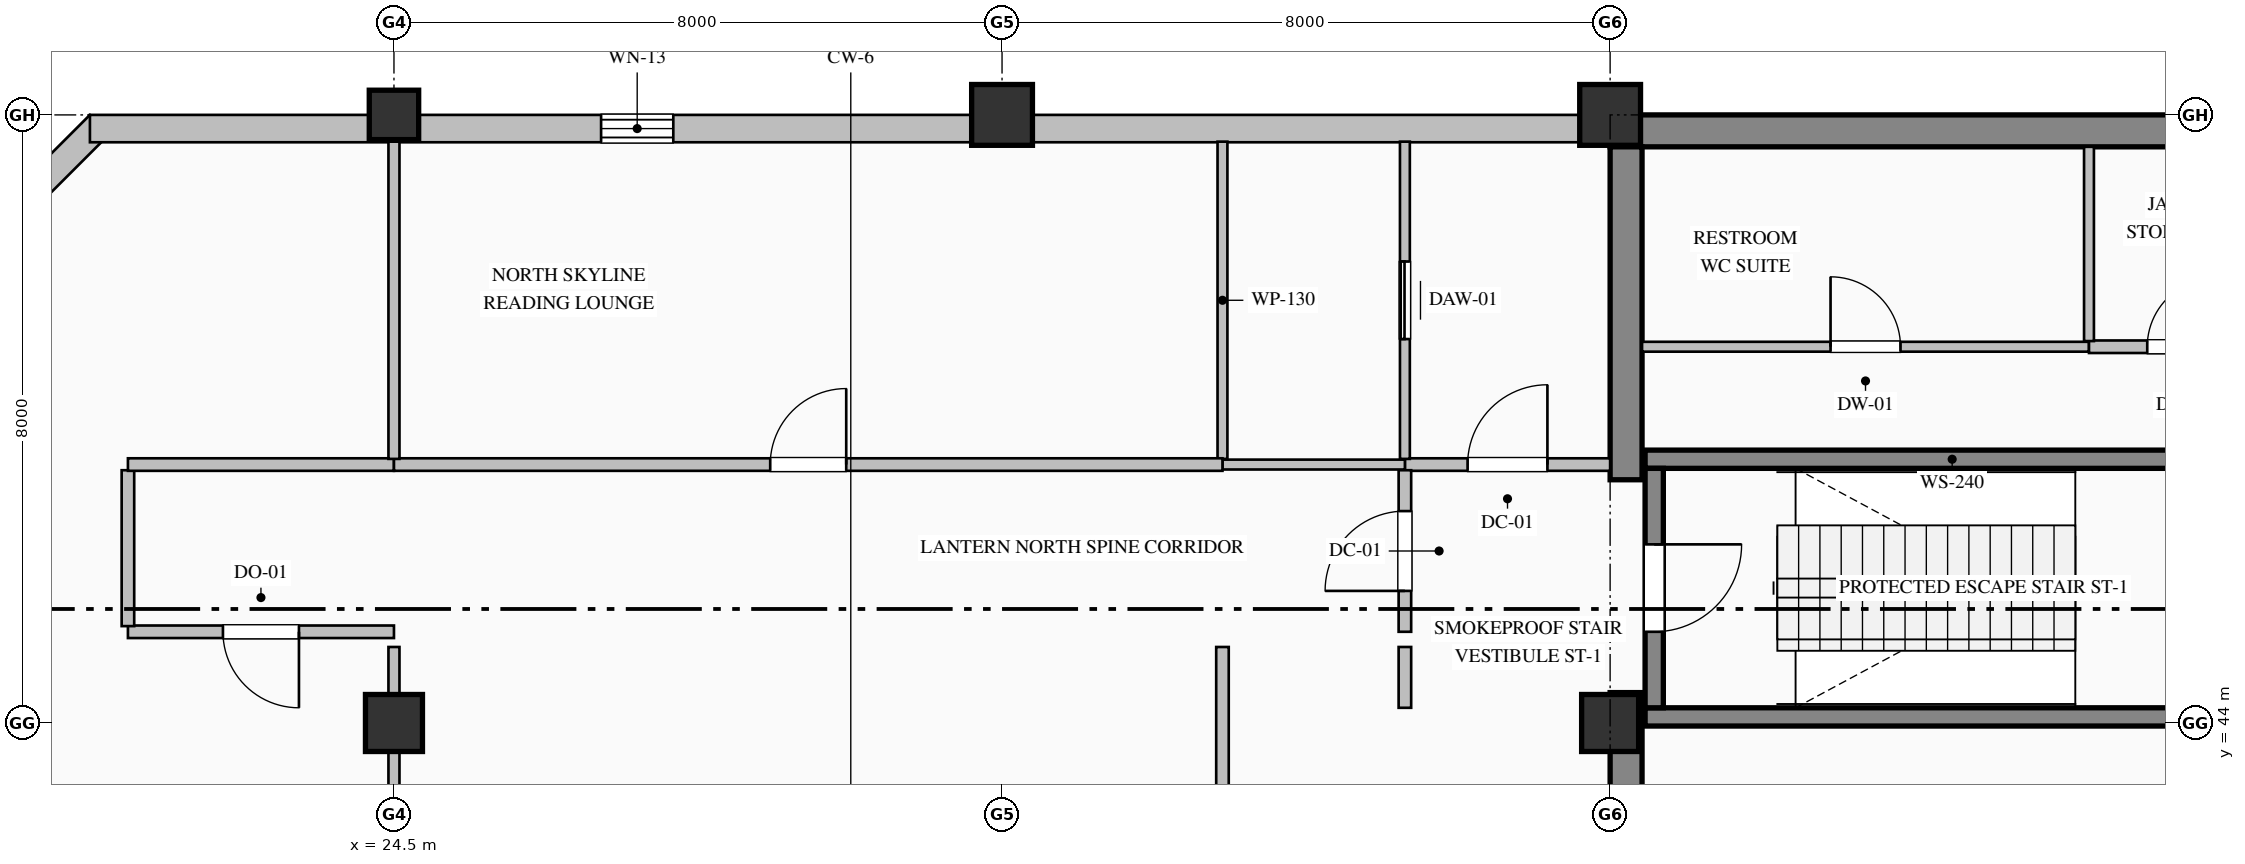
"""IFC4 building model, lengths in metres.
Left out: names, types, materials, properties, quantities, classifications, styles, units other than length and angle.
Written with IfcOpenShell. Run it as: python <this file> out.ifc"""

import sys

from ifc_helpers import new_model, si_unit, direction, frame, frame_2d, origin, origin_2d, place, context, subcontext, project, spatial, rectangle, hollow_rectangle, extrude, element, fill, save


model = new_model("IFC4")
c1 = context("Model", 3, precision=1e-05, world=origin(), true_north=direction((0.0, 1.0)))
c2 = subcontext(c1, "Body", "Model", "MODEL_VIEW")
j1 = project(units=[si_unit("LENGTHUNIT", "METRE"), si_unit("PLANEANGLEUNIT", "RADIAN")], contexts=[c1])
p1 = place(None, origin())
s1 = spatial("IfcSite", under=j1, at=p1, CompositionType="ELEMENT")
p2 = place(p1, origin())
s2 = spatial("IfcBuilding", under=s1, at=p2, CompositionType="ELEMENT")
p3 = place(p2, frame((0.0, 0.0, 373.0)))
s3 = spatial("IfcBuildingStorey", under=s2, at=p3, CompositionType="ELEMENT", Elevation=373.0)
p4 = place(p3, frame((40.5, 51.79, 0.0), z_axis=(0.0, 0.0, 1.0), x_axis=(1.0, 0.0, 0.0)))
e1 = element("IfcWall", 1, at=p4, inside=s3, PredefinedType="SHEAR", context=c2, shape_type="SweptSolid", body=[
    extrude(rectangle(XDim=23.5, YDim=0.42, at=frame_2d((11.75, 0.0))), origin(), (0.0, 0.0, 1.0), 5.11),
])
p5 = place(p3, frame((40.71, 36.42, 0.0), z_axis=(0.0, 0.0, 1.0), x_axis=(0.0, 1.0, 0.0)))
e2 = element("IfcWall", 2, at=p5, inside=s3, PredefinedType="SHEAR", context=c2, shape_type="SweptSolid", body=[
    extrude(rectangle(XDim=7.98, YDim=0.42, at=frame_2d((3.99, 0.0))), origin(), (0.0, 0.0, 1.0), 5.11),
])
p6 = place(p3, frame((40.71, 47.2, 0.0), z_axis=(0.0, 0.0, 1.0), x_axis=(0.0, 1.0, 0.0)))
e3 = element("IfcWall", 3, at=p6, inside=s3, PredefinedType="SHEAR", context=c2, shape_type="SweptSolid", body=[
    extrude(rectangle(XDim=4.38, YDim=0.42, at=frame_2d((2.19, 0.0))), origin(), (0.0, 0.0, 1.0), 5.11),
])
p7 = place(p3, frame((24.5, 44.0, 0.0), z_axis=(0.0, 0.0, 1.0), x_axis=(1.0, 0.0, 0.0)))
e4 = element("IfcColumn", 4, at=p7, inside=s3, PredefinedType="COLUMN", context=c2, shape_type="SweptSolid", body=[
    extrude(rectangle(XDim=0.75, YDim=0.75, at=origin_2d()), origin(), (0.0, 0.0, 1.0), 5.4),
])
p8 = place(p3, frame((24.5, 52.0, 0.0), z_axis=(0.0, 0.0, 1.0), x_axis=(1.0, 0.0, 0.0)))
e5 = element("IfcColumn", 5, at=p8, inside=s3, PredefinedType="COLUMN", context=c2, shape_type="SweptSolid", body=[
    extrude(hollow_rectangle(XDim=0.65, YDim=0.65, WallThickness=0.028, at=origin_2d()), origin(), (0.0, 0.0, 1.0), 5.4),
])
p9 = place(p3, frame((32.5, 52.0, 0.0), z_axis=(0.0, 0.0, 1.0), x_axis=(1.0, 0.0, 0.0)))
e6 = element("IfcColumn", 6, at=p9, inside=s3, PredefinedType="COLUMN", context=c2, shape_type="SweptSolid", body=[
    extrude(hollow_rectangle(XDim=0.8, YDim=0.8, WallThickness=0.032, at=origin_2d()), origin(), (0.0, 0.0, 1.0), 5.4),
])
p10 = place(p3, frame((40.5, 44.0, 0.0), z_axis=(0.0, 0.0, 1.0), x_axis=(1.0, 0.0, 0.0)))
e7 = element("IfcColumn", 7, at=p10, inside=s3, PredefinedType="COLUMN", context=c2, shape_type="SweptSolid", body=[
    extrude(rectangle(XDim=0.75, YDim=0.75, at=origin_2d()), origin(), (0.0, 0.0, 1.0), 5.4),
])
p11 = place(p3, frame((40.5, 52.0, 0.0), z_axis=(0.0, 0.0, 1.0), x_axis=(1.0, 0.0, 0.0)))
e8 = element("IfcColumn", 8, at=p11, inside=s3, PredefinedType="COLUMN", context=c2, shape_type="SweptSolid", body=[
    extrude(hollow_rectangle(XDim=0.8, YDim=0.8, WallThickness=0.032, at=origin_2d()), origin(), (0.0, 0.0, 1.0), 5.4),
])
p12 = place(p3, frame((16.627, 47.873, 0.0), z_axis=(0.0, 0.0, 1.0), x_axis=(0.707106781187, 0.707106781187, 0.0)))
e9 = element("IfcWall", 9, at=p12, inside=s3, PredefinedType="SOLIDWALL", context=c2, shape_type="SweptSolid", body=[
    extrude(rectangle(XDim=5.657, YDim=0.36, at=frame_2d((2.828, 0.0))), origin(), (0.0, 0.0, 1.0), 5.11),
])
p13 = place(p3, frame((20.5, 51.82, 0.0), z_axis=(0.0, 0.0, 1.0), x_axis=(1.0, 0.0, 0.0)))
e10 = element("IfcWall", 10, at=p13, inside=s3, PredefinedType="SOLIDWALL", context=c2, shape_type="SweptSolid", body=[
    extrude(rectangle(XDim=20.02, YDim=0.36, at=frame_2d((10.01, 0.0))), origin(), (0.0, 0.0, 1.0), 4.66),
])
p14 = place(p13, frame((6.725, 0.0, 0.9)))
e11 = element("IfcOpeningElement", 11, at=p14, cuts=e10, PredefinedType="OPENING", context=c2, shape_type="SweptSolid", body=[
    extrude(rectangle(XDim=0.95, YDim=1.85, at=frame_2d((0.475, 0.925))), frame((0.0, 0.19, 0.0), z_axis=(0.0, -1.0, 0.0), x_axis=(1.0, 0.0, 0.0)), (0.0, 0.0, 1.0), 0.38),
])
for number, where, z_axis, x_axis in (
    (12, (40.96, 47.47, 0.0), (0.0, 0.0, 1.0), (1.0, 0.0, 0.0)),
    (13, (49.04, 44.08, 0.0), (0.0, 0.0, 1.0), (-1.0, 0.0, 0.0)),
):
    element("IfcWall", number, at=place(p3, frame(where, z_axis=z_axis, x_axis=x_axis)), inside=s3, PredefinedType="SOLIDWALL", context=c2, shape_type="SweptSolid", body=[
        extrude(rectangle(XDim=8.08, YDim=0.24, at=frame_2d((4.04, 0.0))), origin(), (0.0, 0.0, 1.0), 5.4),
    ])
p15 = place(p3, frame((41.08, 47.35, 0.0), z_axis=(0.0, 0.0, 1.0), x_axis=(0.0, -1.0, 0.0)))
e14 = element("IfcWall", 14, at=p15, inside=s3, PredefinedType="SOLIDWALL", context=c2, shape_type="SweptSolid", body=[
    extrude(rectangle(XDim=3.15, YDim=0.24, at=frame_2d((1.575, 0.0))), origin(), (0.0, 0.0, 1.0), 5.4),
])
p16 = place(p15, frame((1.0, 0.0, 0.0)))
e15 = element("IfcOpeningElement", 15, at=p16, cuts=e14, PredefinedType="OPENING", context=c2, shape_type="SweptSolid", body=[
    extrude(rectangle(XDim=1.15, YDim=2.2, at=frame_2d((0.575, 1.1))), frame((0.0, 0.13, 0.0), z_axis=(0.0, -1.0, 0.0), x_axis=(1.0, 0.0, 0.0)), (0.0, 0.0, 1.0), 0.26),
])
p17 = place(p3, frame((37.8, 47.4, 0.0), z_axis=(0.0, 0.0, 1.0), x_axis=(1.0, 0.0, 0.0)))
e16 = element("IfcWall", 16, at=p17, inside=s3, PredefinedType="PARTITIONING", context=c2, shape_type="SweptSolid", body=[
    extrude(rectangle(XDim=2.7, YDim=0.165, at=frame_2d((1.35, 0.0))), origin(), (0.0, 0.0, 1.0), 5.11),
])
p18 = place(p17, frame((0.825, 0.0, 0.0)))
e17 = element("IfcOpeningElement", 17, at=p18, cuts=e16, PredefinedType="OPENING", context=c2, shape_type="SweptSolid", body=[
    extrude(rectangle(XDim=1.05, YDim=2.15, at=frame_2d((0.525, 1.075))), frame((0.0, 0.093, 0.0), z_axis=(0.0, -1.0, 0.0), x_axis=(1.0, 0.0, 0.0)), (0.0, 0.0, 1.0), 0.185),
])
p19 = place(p3, frame((37.8, 45.2, 0.0), z_axis=(0.0, 0.0, 1.0), x_axis=(0.0, 1.0, 0.0)))
e18 = element("IfcWall", 18, at=p19, inside=s3, PredefinedType="PARTITIONING", context=c2, shape_type="SweptSolid", body=[
    extrude(rectangle(XDim=2.125, YDim=0.165, at=frame_2d((1.063, 0.0))), origin(), (0.0, 0.0, 1.0), 5.11),
])
p20 = place(p19, frame((0.538, 0.0, 0.0)))
e19 = element("IfcOpeningElement", 19, at=p20, cuts=e18, PredefinedType="OPENING", context=c2, shape_type="SweptSolid", body=[
    extrude(rectangle(XDim=1.05, YDim=2.15, at=frame_2d((0.525, 1.075))), frame((0.0, 0.093, 0.0), z_axis=(0.0, -1.0, 0.0), x_axis=(1.0, 0.0, 0.0)), (0.0, 0.0, 1.0), 0.185),
])
p21 = place(p3, frame((37.8, 44.2, 0.0), z_axis=(0.0, 0.0, 1.0), x_axis=(0.0, 1.0, 0.0)))
e20 = element("IfcWall", 20, at=p21, inside=s3, PredefinedType="PARTITIONING", context=c2, shape_type="SweptSolid", body=[
    extrude(rectangle(XDim=0.8, YDim=0.165, at=frame_2d((0.4, 0.0))), origin(), (0.0, 0.0, 1.0), 5.11),
])
p22 = place(p3, frame((37.8, 47.475, 0.0), z_axis=(0.0, 0.0, 1.0), x_axis=(0.0, 1.0, 0.0)))
e21 = element("IfcWall", 21, at=p22, inside=s3, PredefinedType="PARTITIONING", context=c2, shape_type="SweptSolid", body=[
    extrude(rectangle(XDim=4.173, YDim=0.13, at=frame_2d((2.087, 0.0))), origin(), (0.0, 0.0, 1.0), 5.11),
])
p23 = place(p22, frame((1.577, 0.0, 0.0)))
e22 = element("IfcOpeningElement", 22, at=p23, cuts=e21, PredefinedType="OPENING", context=c2, shape_type="SweptSolid", body=[
    extrude(rectangle(XDim=1.02, YDim=2.15, at=frame_2d((0.51, 1.075))), frame((0.0, 0.075, 0.0), z_axis=(0.0, -1.0, 0.0), x_axis=(1.0, 0.0, 0.0)), (0.0, 0.0, 1.0), 0.15),
])
p24 = place(p3, frame((37.8, 47.4, 0.0), z_axis=(0.0, 0.0, 1.0), x_axis=(-1.0, 0.0, 0.0)))
e23 = element("IfcWall", 23, at=p24, inside=s3, PredefinedType="PARTITIONING", context=c2, shape_type="SweptSolid", body=[
    extrude(rectangle(XDim=2.4, YDim=0.13, at=frame_2d((1.2, 0.0))), origin(), (0.0, 0.0, 1.0), 5.11),
])
p25 = place(p3, frame((35.4, 47.475, 0.0), z_axis=(0.0, 0.0, 1.0), x_axis=(0.0, 1.0, 0.0)))
e24 = element("IfcWall", 24, at=p25, inside=s3, PredefinedType="PARTITIONING", context=c2, shape_type="SweptSolid", body=[
    extrude(rectangle(XDim=4.173, YDim=0.13, at=frame_2d((2.087, 0.0))), origin(), (0.0, 0.0, 1.0), 5.11),
])
p26 = place(p3, frame((40.92, 48.95, 0.0), z_axis=(0.0, 0.0, 1.0), x_axis=(1.0, 0.0, 0.0)))
e25 = element("IfcWall", 25, at=p26, inside=s3, PredefinedType="PARTITIONING", context=c2, shape_type="SweptSolid", body=[
    extrude(rectangle(XDim=5.88, YDim=0.13, at=frame_2d((2.94, 0.0))), origin(), (0.0, 0.0, 1.0), 5.11),
])
p27 = place(p26, frame((2.48, 0.0, 0.0)))
e26 = element("IfcOpeningElement", 26, at=p27, cuts=e25, PredefinedType="OPENING", context=c2, shape_type="SweptSolid", body=[
    extrude(rectangle(XDim=0.92, YDim=2.15, at=frame_2d((0.46, 1.075))), frame((0.0, 0.075, 0.0), z_axis=(0.0, -1.0, 0.0), x_axis=(1.0, 0.0, 0.0)), (0.0, 0.0, 1.0), 0.15),
])
p28 = place(p3, frame((46.8, 48.95, 0.0), z_axis=(0.0, 0.0, 1.0), x_axis=(1.0, 0.0, 0.0)))
e27 = element("IfcWall", 27, at=p28, inside=s3, PredefinedType="PARTITIONING", context=c2, shape_type="SweptSolid", body=[
    extrude(rectangle(XDim=2.433, YDim=0.165, at=frame_2d((1.216, 0.0))), origin(), (0.0, 0.0, 1.0), 5.11),
])
p29 = place(p28, frame((0.767, 0.0, 0.0)))
e28 = element("IfcOpeningElement", 28, at=p29, cuts=e27, PredefinedType="OPENING", context=c2, shape_type="SweptSolid", body=[
    extrude(rectangle(XDim=0.9, YDim=2.15, at=frame_2d((0.45, 1.075))), frame((0.0, 0.093, 0.0), z_axis=(0.0, -1.0, 0.0), x_axis=(1.0, 0.0, 0.0)), (0.0, 0.0, 1.0), 0.185),
])
p30 = place(p3, frame((46.8, 51.58, 0.0), z_axis=(0.0, 0.0, 1.0), x_axis=(0.0, -1.0, 0.0)))
e29 = element("IfcWall", 29, at=p30, inside=s3, PredefinedType="PARTITIONING", context=c2, shape_type="SweptSolid", body=[
    extrude(rectangle(XDim=2.556, YDim=0.13, at=frame_2d((1.278, 0.0))), origin(), (0.0, 0.0, 1.0), 5.11),
])
p31 = place(p3, frame((24.5, 45.2, 0.0), z_axis=(0.0, 0.0, 1.0), x_axis=(-1.0, 0.0, 0.0)))
e30 = element("IfcWall", 30, at=p31, inside=s3, PredefinedType="PARTITIONING", context=c2, shape_type="SweptSolid", body=[
    extrude(rectangle(XDim=3.5, YDim=0.165, at=frame_2d((1.75, 0.0))), origin(), (0.0, 0.0, 1.0), 5.11),
])
p32 = place(p31, frame((1.25, 0.0, 0.0)))
e31 = element("IfcOpeningElement", 31, at=p32, cuts=e30, PredefinedType="OPENING", context=c2, shape_type="SweptSolid", body=[
    extrude(rectangle(XDim=1.0, YDim=2.15, at=frame_2d((0.5, 1.075))), frame((0.0, 0.093, 0.0), z_axis=(0.0, -1.0, 0.0), x_axis=(1.0, 0.0, 0.0)), (0.0, 0.0, 1.0), 0.185),
])
p33 = place(p3, frame((21.0, 45.274, 0.0), z_axis=(0.0, 0.0, 1.0), x_axis=(0.0, 1.0, 0.0)))
e32 = element("IfcWall", 32, at=p33, inside=s3, PredefinedType="PARTITIONING", context=c2, shape_type="SweptSolid", body=[
    extrude(rectangle(XDim=2.051, YDim=0.165, at=frame_2d((1.025, 0.0))), origin(), (0.0, 0.0, 1.0), 5.11),
])
p34 = place(p3, frame((21.0, 47.4, 0.0), z_axis=(0.0, 0.0, 1.0), x_axis=(1.0, 0.0, 0.0)))
e33 = element("IfcWall", 33, at=p34, inside=s3, PredefinedType="PARTITIONING", context=c2, shape_type="SweptSolid", body=[
    extrude(rectangle(XDim=3.5, YDim=0.165, at=frame_2d((1.75, 0.0))), origin(), (0.0, 0.0, 1.0), 5.11),
])
p35 = place(p3, frame((24.5, 47.4, 0.0), z_axis=(0.0, 0.0, 1.0), x_axis=(1.0, 0.0, 0.0)))
e34 = element("IfcWall", 34, at=p35, inside=s3, PredefinedType="PARTITIONING", context=c2, shape_type="SweptSolid", body=[
    extrude(rectangle(XDim=10.9, YDim=0.165, at=frame_2d((5.45, 0.0))), origin(), (0.0, 0.0, 1.0), 5.11),
])
p36 = place(p35, frame((4.95, 0.0, 0.0)))
e35 = element("IfcOpeningElement", 35, at=p36, cuts=e34, PredefinedType="OPENING", context=c2, shape_type="SweptSolid", body=[
    extrude(rectangle(XDim=1.0, YDim=2.15, at=frame_2d((0.5, 1.075))), frame((0.0, 0.093, 0.0), z_axis=(0.0, -1.0, 0.0), x_axis=(1.0, 0.0, 0.0)), (0.0, 0.0, 1.0), 0.185),
])
p37 = place(p3, frame((35.4, 36.064, 0.0), z_axis=(0.0, 0.0, 1.0), x_axis=(0.0, 1.0, 0.0)))
e36 = element("IfcWall", 36, at=p37, inside=s3, PredefinedType="PARTITIONING", context=c2, shape_type="SweptSolid", body=[
    extrude(rectangle(XDim=8.936, YDim=0.165, at=frame_2d((4.468, 0.0))), origin(), (0.0, 0.0, 1.0), 5.11),
])
p38 = place(p37, frame((3.968, 0.0, 0.0)))
e37 = element("IfcOpeningElement", 37, at=p38, cuts=e36, PredefinedType="OPENING", context=c2, shape_type="SweptSolid", body=[
    extrude(rectangle(XDim=1.0, YDim=2.15, at=frame_2d((0.5, 1.075))), frame((0.0, 0.093, 0.0), z_axis=(0.0, -1.0, 0.0), x_axis=(1.0, 0.0, 0.0)), (0.0, 0.0, 1.0), 0.185),
])
p39 = place(p3, frame((24.5, 36.064, 0.0), z_axis=(0.0, 0.0, 1.0), x_axis=(0.0, 1.0, 0.0)))
e38 = element("IfcWall", 38, at=p39, inside=s3, PredefinedType="PARTITIONING", context=c2, shape_type="SweptSolid", body=[
    extrude(rectangle(XDim=8.936, YDim=0.145, at=frame_2d((4.468, 0.0))), origin(), (0.0, 0.0, 1.0), 4.502),
])
p40 = place(p3, frame((24.5, 51.648, 0.0), z_axis=(0.0, 0.0, 1.0), x_axis=(0.0, -1.0, 0.0)))
e39 = element("IfcWall", 39, at=p40, inside=s3, PredefinedType="PARTITIONING", context=c2, shape_type="SweptSolid", body=[
    extrude(rectangle(XDim=4.173, YDim=0.145, at=frame_2d((2.087, 0.0))), origin(), (0.0, 0.0, 1.0), 4.502),
])
p41 = place(p14, origin())
e40 = element("IfcWindow", 40, at=p41, inside=s3, PartitioningType="SINGLE_PANEL", PredefinedType="WINDOW", context=c2, shape_type="SweptSolid", body=[
    extrude(rectangle(XDim=0.95, YDim=1.85, at=frame_2d((0.475, 0.925))), frame((0.0, 0.15, 0.0), z_axis=(0.0, -1.0, 0.0), x_axis=(1.0, 0.0, 0.0)), (0.0, 0.0, 1.0), 0.06),
])
fill(e11, e40)
p42 = place(p16, origin())
e41 = element("IfcDoor", 41, at=p42, inside=s3, OperationType="SINGLE_SWING_LEFT", PredefinedType="DOOR", context=c2, shape_type="SweptSolid", body=[
    extrude(rectangle(XDim=1.15, YDim=2.2, at=frame_2d((0.575, 1.1))), frame((0.0, 0.025, 0.0), z_axis=(0.0, -1.0, 0.0), x_axis=(1.0, 0.0, 0.0)), (0.0, 0.0, 1.0), 0.05),
])
fill(e15, e41)
p43 = place(p18, origin())
e42 = element("IfcDoor", 42, at=p43, inside=s3, OperationType="SINGLE_SWING_RIGHT", PredefinedType="DOOR", context=c2, shape_type="SweptSolid", body=[
    extrude(rectangle(XDim=1.05, YDim=2.15, at=frame_2d((0.525, 1.075))), frame((0.0, 0.025, 0.0), z_axis=(0.0, -1.0, 0.0), x_axis=(1.0, 0.0, 0.0)), (0.0, 0.0, 1.0), 0.05),
])
fill(e17, e42)
p44 = place(p20, origin())
e43 = element("IfcDoor", 43, at=p44, inside=s3, OperationType="SINGLE_SWING_LEFT", PredefinedType="DOOR", context=c2, shape_type="SweptSolid", body=[
    extrude(rectangle(XDim=1.05, YDim=2.15, at=frame_2d((0.525, 1.075))), frame((0.0, 0.025, 0.0), z_axis=(0.0, -1.0, 0.0), x_axis=(1.0, 0.0, 0.0)), (0.0, 0.0, 1.0), 0.05),
])
fill(e19, e43)
p45 = place(p23, origin())
e44 = element("IfcDoor", 44, at=p45, inside=s3, OperationType="SLIDING_TO_LEFT", PredefinedType="DOOR", context=c2, shape_type="SweptSolid", body=[
    extrude(rectangle(XDim=1.02, YDim=2.15, at=frame_2d((0.51, 1.075))), frame((0.0, 0.025, 0.0), z_axis=(0.0, -1.0, 0.0), x_axis=(1.0, 0.0, 0.0)), (0.0, 0.0, 1.0), 0.05),
])
fill(e22, e44)
p46 = place(p27, origin())
e45 = element("IfcDoor", 45, at=p46, inside=s3, OperationType="SINGLE_SWING_LEFT", PredefinedType="DOOR", context=c2, shape_type="SweptSolid", body=[
    extrude(rectangle(XDim=0.92, YDim=2.15, at=frame_2d((0.46, 1.075))), frame((0.0, 0.025, 0.0), z_axis=(0.0, -1.0, 0.0), x_axis=(1.0, 0.0, 0.0)), (0.0, 0.0, 1.0), 0.05),
])
fill(e26, e45)
p47 = place(p29, origin())
e46 = element("IfcDoor", 46, at=p47, inside=s3, OperationType="SINGLE_SWING_RIGHT", PredefinedType="DOOR", context=c2, shape_type="SweptSolid", body=[
    extrude(rectangle(XDim=0.9, YDim=2.15, at=frame_2d((0.45, 1.075))), frame((0.0, 0.025, 0.0), z_axis=(0.0, -1.0, 0.0), x_axis=(1.0, 0.0, 0.0)), (0.0, 0.0, 1.0), 0.05),
])
fill(e28, e46)
p48 = place(p32, origin())
e47 = element("IfcDoor", 47, at=p48, inside=s3, OperationType="SINGLE_SWING_LEFT", PredefinedType="DOOR", context=c2, shape_type="SweptSolid", body=[
    extrude(rectangle(XDim=1.0, YDim=2.15, at=frame_2d((0.5, 1.075))), frame((0.0, 0.025, 0.0), z_axis=(0.0, -1.0, 0.0), x_axis=(1.0, 0.0, 0.0)), (0.0, 0.0, 1.0), 0.05),
])
fill(e31, e47)
p49 = place(p36, origin())
e48 = element("IfcDoor", 48, at=p49, inside=s3, OperationType="SINGLE_SWING_RIGHT", PredefinedType="DOOR", context=c2, shape_type="SweptSolid", body=[
    extrude(rectangle(XDim=1.0, YDim=2.15, at=frame_2d((0.5, 1.075))), frame((0.0, 0.025, 0.0), z_axis=(0.0, -1.0, 0.0), x_axis=(1.0, 0.0, 0.0)), (0.0, 0.0, 1.0), 0.05),
])
fill(e35, e48)
save(model, sys.argv[1])
